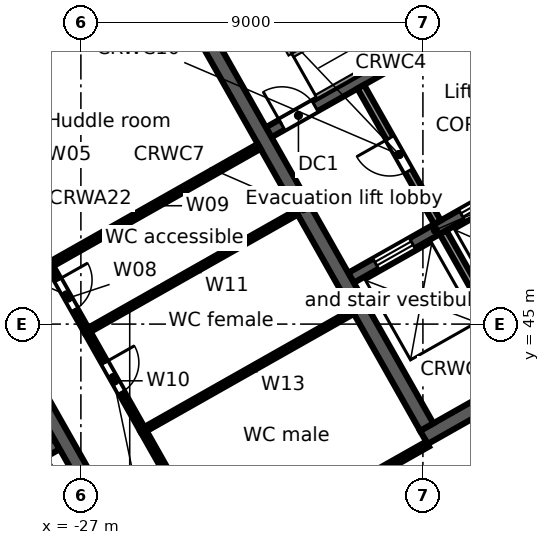
"""IFC4 building model, lengths in metres.
Left out: names, types, materials, properties, quantities, classifications, styles, units other than length and angle.
Written with IfcOpenShell. Run it as: python <this file> out.ifc"""

import sys

from ifc_helpers import new_model, si_unit, direction, frame, frame_2d, origin, place, context, subcontext, project, spatial, rectangle, extrude, element, fill, save


model = new_model("IFC4")
c1 = context("Model", 3, precision=1e-05, world=origin(), true_north=direction((0.0, 1.0)))
c2 = subcontext(c1, "Body", "Model", "MODEL_VIEW")
j1 = project(units=[si_unit("LENGTHUNIT", "METRE"), si_unit("PLANEANGLEUNIT", "RADIAN")], contexts=[c1])
p1 = place(None, origin())
s1 = spatial("IfcSite", under=j1, at=p1, CompositionType="ELEMENT")
p2 = place(p1, origin())
s2 = spatial("IfcBuilding", under=s1, at=p2, CompositionType="ELEMENT")
p3 = place(p2, frame((0.0, 0.0, 277.9)))
s3 = spatial("IfcBuildingStorey", under=s2, at=p3, CompositionType="ELEMENT", Elevation=277.9)
p4 = place(p3, frame((-58.732, 38.771, 0.0), z_axis=(0.0, 0.0, 1.0), x_axis=(0.870355615581, 0.492423702137, 0.0)))
e1 = element("IfcWall", 1, at=p4, inside=s3, PredefinedType="STANDARD", context=c2, shape_type="SweptSolid", body=[
    extrude(rectangle(XDim=64.052, YDim=0.25, at=frame_2d((32.026, 0.0))), origin(), (0.0, 0.0, 1.0), 3.52),
])
p5 = place(p4, frame((61.259, 0.0, 0.8)))
e2 = element("IfcOpeningElement", 2, at=p5, cuts=e1, PredefinedType="OPENING", context=c2, shape_type="SweptSolid", body=[
    extrude(rectangle(XDim=2.4, YDim=2.2, at=frame_2d((1.2, 1.1))), frame((0.0, 0.135, 0.0), z_axis=(0.0, -1.0, 0.0), x_axis=(1.0, 0.0, 0.0)), (0.0, 0.0, 1.0), 0.27),
])
p6 = place(p4, frame((58.216, 0.0, 0.8)))
e3 = element("IfcOpeningElement", 3, at=p6, cuts=e1, PredefinedType="OPENING", context=c2, shape_type="SweptSolid", body=[
    extrude(rectangle(XDim=2.4, YDim=2.2, at=frame_2d((1.2, 1.1))), frame((0.0, 0.135, 0.0), z_axis=(0.0, -1.0, 0.0), x_axis=(1.0, 0.0, 0.0)), (0.0, 0.0, 1.0), 0.27),
])
p7 = place(p4, frame((55.173, 0.0, 0.8)))
e4 = element("IfcOpeningElement", 4, at=p7, cuts=e1, PredefinedType="OPENING", context=c2, shape_type="SweptSolid", body=[
    extrude(rectangle(XDim=2.4, YDim=2.2, at=frame_2d((1.2, 1.1))), frame((0.0, 0.135, 0.0), z_axis=(0.0, -1.0, 0.0), x_axis=(1.0, 0.0, 0.0)), (0.0, 0.0, 1.0), 0.27),
])
p8 = place(p4, frame((52.129, 0.0, 0.8)))
e5 = element("IfcOpeningElement", 5, at=p8, cuts=e1, PredefinedType="OPENING", context=c2, shape_type="SweptSolid", body=[
    extrude(rectangle(XDim=2.4, YDim=2.2, at=frame_2d((1.2, 1.1))), frame((0.0, 0.135, 0.0), z_axis=(0.0, -1.0, 0.0), x_axis=(1.0, 0.0, 0.0)), (0.0, 0.0, 1.0), 0.27),
])
p9 = place(p4, frame((49.086, 0.0, 0.8)))
e6 = element("IfcOpeningElement", 6, at=p9, cuts=e1, PredefinedType="OPENING", context=c2, shape_type="SweptSolid", body=[
    extrude(rectangle(XDim=2.4, YDim=2.2, at=frame_2d((1.2, 1.1))), frame((0.0, 0.135, 0.0), z_axis=(0.0, -1.0, 0.0), x_axis=(1.0, 0.0, 0.0)), (0.0, 0.0, 1.0), 0.27),
])
p10 = place(p4, frame((46.043, 0.0, 0.8)))
e7 = element("IfcOpeningElement", 7, at=p10, cuts=e1, PredefinedType="OPENING", context=c2, shape_type="SweptSolid", body=[
    extrude(rectangle(XDim=2.4, YDim=2.2, at=frame_2d((1.2, 1.1))), frame((0.0, 0.135, 0.0), z_axis=(0.0, -1.0, 0.0), x_axis=(1.0, 0.0, 0.0)), (0.0, 0.0, 1.0), 0.27),
])
p11 = place(p4, frame((43.0, 0.0, 0.8)))
e8 = element("IfcOpeningElement", 8, at=p11, cuts=e1, PredefinedType="OPENING", context=c2, shape_type="SweptSolid", body=[
    extrude(rectangle(XDim=2.4, YDim=2.2, at=frame_2d((1.2, 1.1))), frame((0.0, 0.135, 0.0), z_axis=(0.0, -1.0, 0.0), x_axis=(1.0, 0.0, 0.0)), (0.0, 0.0, 1.0), 0.27),
])
p12 = place(p4, frame((39.956, 0.0, 0.8)))
e9 = element("IfcOpeningElement", 9, at=p12, cuts=e1, PredefinedType="OPENING", context=c2, shape_type="SweptSolid", body=[
    extrude(rectangle(XDim=2.4, YDim=2.2, at=frame_2d((1.2, 1.1))), frame((0.0, 0.135, 0.0), z_axis=(0.0, -1.0, 0.0), x_axis=(1.0, 0.0, 0.0)), (0.0, 0.0, 1.0), 0.27),
])
p13 = place(p4, frame((36.913, 0.0, 0.8)))
e10 = element("IfcOpeningElement", 10, at=p13, cuts=e1, PredefinedType="OPENING", context=c2, shape_type="SweptSolid", body=[
    extrude(rectangle(XDim=2.4, YDim=2.2, at=frame_2d((1.2, 1.1))), frame((0.0, 0.135, 0.0), z_axis=(0.0, -1.0, 0.0), x_axis=(1.0, 0.0, 0.0)), (0.0, 0.0, 1.0), 0.27),
])
p14 = place(p4, frame((33.87, 0.0, 0.8)))
e11 = element("IfcOpeningElement", 11, at=p14, cuts=e1, PredefinedType="OPENING", context=c2, shape_type="SweptSolid", body=[
    extrude(rectangle(XDim=2.4, YDim=2.2, at=frame_2d((1.2, 1.1))), frame((0.0, 0.135, 0.0), z_axis=(0.0, -1.0, 0.0), x_axis=(1.0, 0.0, 0.0)), (0.0, 0.0, 1.0), 0.27),
])
p15 = place(p4, frame((30.826, 0.0, 0.8)))
e12 = element("IfcOpeningElement", 12, at=p15, cuts=e1, PredefinedType="OPENING", context=c2, shape_type="SweptSolid", body=[
    extrude(rectangle(XDim=2.4, YDim=2.2, at=frame_2d((1.2, 1.1))), frame((0.0, 0.135, 0.0), z_axis=(0.0, -1.0, 0.0), x_axis=(1.0, 0.0, 0.0)), (0.0, 0.0, 1.0), 0.27),
])
p16 = place(p4, frame((27.783, 0.0, 0.8)))
e13 = element("IfcOpeningElement", 13, at=p16, cuts=e1, PredefinedType="OPENING", context=c2, shape_type="SweptSolid", body=[
    extrude(rectangle(XDim=2.4, YDim=2.2, at=frame_2d((1.2, 1.1))), frame((0.0, 0.135, 0.0), z_axis=(0.0, -1.0, 0.0), x_axis=(1.0, 0.0, 0.0)), (0.0, 0.0, 1.0), 0.27),
])
p17 = place(p4, frame((24.74, 0.0, 0.8)))
e14 = element("IfcOpeningElement", 14, at=p17, cuts=e1, PredefinedType="OPENING", context=c2, shape_type="SweptSolid", body=[
    extrude(rectangle(XDim=2.4, YDim=2.2, at=frame_2d((1.2, 1.1))), frame((0.0, 0.135, 0.0), z_axis=(0.0, -1.0, 0.0), x_axis=(1.0, 0.0, 0.0)), (0.0, 0.0, 1.0), 0.27),
])
p18 = place(p4, frame((21.696, 0.0, 0.8)))
e15 = element("IfcOpeningElement", 15, at=p18, cuts=e1, PredefinedType="OPENING", context=c2, shape_type="SweptSolid", body=[
    extrude(rectangle(XDim=2.4, YDim=2.2, at=frame_2d((1.2, 1.1))), frame((0.0, 0.135, 0.0), z_axis=(0.0, -1.0, 0.0), x_axis=(1.0, 0.0, 0.0)), (0.0, 0.0, 1.0), 0.27),
])
p19 = place(p4, frame((18.653, 0.0, 0.8)))
e16 = element("IfcOpeningElement", 16, at=p19, cuts=e1, PredefinedType="OPENING", context=c2, shape_type="SweptSolid", body=[
    extrude(rectangle(XDim=2.4, YDim=2.2, at=frame_2d((1.2, 1.1))), frame((0.0, 0.135, 0.0), z_axis=(0.0, -1.0, 0.0), x_axis=(1.0, 0.0, 0.0)), (0.0, 0.0, 1.0), 0.27),
])
p20 = place(p4, frame((15.61, 0.0, 0.8)))
e17 = element("IfcOpeningElement", 17, at=p20, cuts=e1, PredefinedType="OPENING", context=c2, shape_type="SweptSolid", body=[
    extrude(rectangle(XDim=2.4, YDim=2.2, at=frame_2d((1.2, 1.1))), frame((0.0, 0.135, 0.0), z_axis=(0.0, -1.0, 0.0), x_axis=(1.0, 0.0, 0.0)), (0.0, 0.0, 1.0), 0.27),
])
p21 = place(p4, frame((12.567, 0.0, 0.8)))
e18 = element("IfcOpeningElement", 18, at=p21, cuts=e1, PredefinedType="OPENING", context=c2, shape_type="SweptSolid", body=[
    extrude(rectangle(XDim=2.4, YDim=2.2, at=frame_2d((1.2, 1.1))), frame((0.0, 0.135, 0.0), z_axis=(0.0, -1.0, 0.0), x_axis=(1.0, 0.0, 0.0)), (0.0, 0.0, 1.0), 0.27),
])
p22 = place(p4, frame((9.523, 0.0, 0.8)))
e19 = element("IfcOpeningElement", 19, at=p22, cuts=e1, PredefinedType="OPENING", context=c2, shape_type="SweptSolid", body=[
    extrude(rectangle(XDim=2.4, YDim=2.2, at=frame_2d((1.2, 1.1))), frame((0.0, 0.135, 0.0), z_axis=(0.0, -1.0, 0.0), x_axis=(1.0, 0.0, 0.0)), (0.0, 0.0, 1.0), 0.27),
])
p23 = place(p4, frame((6.48, 0.0, 0.8)))
e20 = element("IfcOpeningElement", 20, at=p23, cuts=e1, PredefinedType="OPENING", context=c2, shape_type="SweptSolid", body=[
    extrude(rectangle(XDim=2.4, YDim=2.2, at=frame_2d((1.2, 1.1))), frame((0.0, 0.135, 0.0), z_axis=(0.0, -1.0, 0.0), x_axis=(1.0, 0.0, 0.0)), (0.0, 0.0, 1.0), 0.27),
])
p24 = place(p4, frame((3.437, 0.0, 0.8)))
e21 = element("IfcOpeningElement", 21, at=p24, cuts=e1, PredefinedType="OPENING", context=c2, shape_type="SweptSolid", body=[
    extrude(rectangle(XDim=2.4, YDim=2.2, at=frame_2d((1.2, 1.1))), frame((0.0, 0.135, 0.0), z_axis=(0.0, -1.0, 0.0), x_axis=(1.0, 0.0, 0.0)), (0.0, 0.0, 1.0), 0.27),
])
p25 = place(p4, frame((0.393, 0.0, 0.8)))
e22 = element("IfcOpeningElement", 22, at=p25, cuts=e1, PredefinedType="OPENING", context=c2, shape_type="SweptSolid", body=[
    extrude(rectangle(XDim=2.4, YDim=2.2, at=frame_2d((1.2, 1.1))), frame((0.0, 0.135, 0.0), z_axis=(0.0, -1.0, 0.0), x_axis=(1.0, 0.0, 0.0)), (0.0, 0.0, 1.0), 0.27),
])
p26 = place(p3, frame((-3.017, 46.293, 0.0), z_axis=(0.0, 0.0, 1.0), x_axis=(-0.870355474887, -0.492423950812, 0.0)))
e23 = element("IfcWall", 23, at=p26, inside=s3, PredefinedType="STANDARD", context=c2, shape_type="SweptSolid", body=[
    extrude(rectangle(XDim=40.34, YDim=0.25, at=frame_2d((20.17, 0.0))), origin(), (0.0, 0.0, 1.0), 3.52),
])
p27 = place(p26, frame((37.428, 0.0, 0.8)))
e24 = element("IfcOpeningElement", 24, at=p27, cuts=e23, PredefinedType="OPENING", context=c2, shape_type="SweptSolid", body=[
    extrude(rectangle(XDim=2.4, YDim=2.2, at=frame_2d((1.2, 1.1))), frame((0.0, 0.135, 0.0), z_axis=(0.0, -1.0, 0.0), x_axis=(1.0, 0.0, 0.0)), (0.0, 0.0, 1.0), 0.27),
])
p28 = place(p26, frame((34.372, 0.0, 0.0)))
e25 = element("IfcOpeningElement", 25, at=p28, cuts=e23, PredefinedType="OPENING", context=c2, shape_type="SweptSolid", body=[
    extrude(rectangle(XDim=1.8, YDim=2.4, at=frame_2d((0.9, 1.2))), frame((0.0, 0.135, 0.0), z_axis=(0.0, -1.0, 0.0), x_axis=(1.0, 0.0, 0.0)), (0.0, 0.0, 1.0), 0.27),
])
p29 = place(p26, frame((30.716, 0.0, 0.8)))
e26 = element("IfcOpeningElement", 26, at=p29, cuts=e23, PredefinedType="OPENING", context=c2, shape_type="SweptSolid", body=[
    extrude(rectangle(XDim=2.4, YDim=2.2, at=frame_2d((1.2, 1.1))), frame((0.0, 0.135, 0.0), z_axis=(0.0, -1.0, 0.0), x_axis=(1.0, 0.0, 0.0)), (0.0, 0.0, 1.0), 0.27),
])
p30 = place(p26, frame((27.36, 0.0, 0.8)))
e27 = element("IfcOpeningElement", 27, at=p30, cuts=e23, PredefinedType="OPENING", context=c2, shape_type="SweptSolid", body=[
    extrude(rectangle(XDim=2.4, YDim=2.2, at=frame_2d((1.2, 1.1))), frame((0.0, 0.135, 0.0), z_axis=(0.0, -1.0, 0.0), x_axis=(1.0, 0.0, 0.0)), (0.0, 0.0, 1.0), 0.27),
])
p31 = place(p26, frame((24.304, 0.0, 0.0)))
e28 = element("IfcOpeningElement", 28, at=p31, cuts=e23, PredefinedType="OPENING", context=c2, shape_type="SweptSolid", body=[
    extrude(rectangle(XDim=1.8, YDim=2.4, at=frame_2d((0.9, 1.2))), frame((0.0, 0.135, 0.0), z_axis=(0.0, -1.0, 0.0), x_axis=(1.0, 0.0, 0.0)), (0.0, 0.0, 1.0), 0.27),
])
p32 = place(p26, frame((20.648, 0.0, 0.8)))
e29 = element("IfcOpeningElement", 29, at=p32, cuts=e23, PredefinedType="OPENING", context=c2, shape_type="SweptSolid", body=[
    extrude(rectangle(XDim=2.4, YDim=2.2, at=frame_2d((1.2, 1.1))), frame((0.0, 0.135, 0.0), z_axis=(0.0, -1.0, 0.0), x_axis=(1.0, 0.0, 0.0)), (0.0, 0.0, 1.0), 0.27),
])
p33 = place(p26, frame((17.292, 0.0, 0.8)))
e30 = element("IfcOpeningElement", 30, at=p33, cuts=e23, PredefinedType="OPENING", context=c2, shape_type="SweptSolid", body=[
    extrude(rectangle(XDim=2.4, YDim=2.2, at=frame_2d((1.2, 1.1))), frame((0.0, 0.135, 0.0), z_axis=(0.0, -1.0, 0.0), x_axis=(1.0, 0.0, 0.0)), (0.0, 0.0, 1.0), 0.27),
])
p34 = place(p26, frame((14.236, 0.0, 0.0)))
e31 = element("IfcOpeningElement", 31, at=p34, cuts=e23, PredefinedType="OPENING", context=c2, shape_type="SweptSolid", body=[
    extrude(rectangle(XDim=1.8, YDim=2.4, at=frame_2d((0.9, 1.2))), frame((0.0, 0.135, 0.0), z_axis=(0.0, -1.0, 0.0), x_axis=(1.0, 0.0, 0.0)), (0.0, 0.0, 1.0), 0.27),
])
p35 = place(p26, frame((10.58, 0.0, 0.8)))
e32 = element("IfcOpeningElement", 32, at=p35, cuts=e23, PredefinedType="OPENING", context=c2, shape_type="SweptSolid", body=[
    extrude(rectangle(XDim=2.4, YDim=2.2, at=frame_2d((1.2, 1.1))), frame((0.0, 0.135, 0.0), z_axis=(0.0, -1.0, 0.0), x_axis=(1.0, 0.0, 0.0)), (0.0, 0.0, 1.0), 0.27),
])
p36 = place(p26, frame((7.224, 0.0, 0.8)))
e33 = element("IfcOpeningElement", 33, at=p36, cuts=e23, PredefinedType="OPENING", context=c2, shape_type="SweptSolid", body=[
    extrude(rectangle(XDim=2.4, YDim=2.2, at=frame_2d((1.2, 1.1))), frame((0.0, 0.135, 0.0), z_axis=(0.0, -1.0, 0.0), x_axis=(1.0, 0.0, 0.0)), (0.0, 0.0, 1.0), 0.27),
])
p37 = place(p26, frame((4.168, 0.0, 0.0)))
e34 = element("IfcOpeningElement", 34, at=p37, cuts=e23, PredefinedType="OPENING", context=c2, shape_type="SweptSolid", body=[
    extrude(rectangle(XDim=1.8, YDim=2.4, at=frame_2d((0.9, 1.2))), frame((0.0, 0.135, 0.0), z_axis=(0.0, -1.0, 0.0), x_axis=(1.0, 0.0, 0.0)), (0.0, 0.0, 1.0), 0.27),
])
p38 = place(p26, frame((0.512, 0.0, 0.8)))
e35 = element("IfcOpeningElement", 35, at=p38, cuts=e23, PredefinedType="OPENING", context=c2, shape_type="SweptSolid", body=[
    extrude(rectangle(XDim=2.4, YDim=2.2, at=frame_2d((1.2, 1.1))), frame((0.0, 0.135, 0.0), z_axis=(0.0, -1.0, 0.0), x_axis=(1.0, 0.0, 0.0)), (0.0, 0.0, 1.0), 0.27),
])
p39 = place(p3, frame((-34.245, 38.097, 0.0), z_axis=(0.0, 0.0, 1.0), x_axis=(0.870356351998, 0.492422400523, 0.0)))
e36 = element("IfcWall", 36, at=p39, inside=s3, PredefinedType="SOLIDWALL", context=c2, shape_type="SweptSolid", body=[
    extrude(rectangle(XDim=7.6, YDim=0.3, at=frame_2d((3.8, 0.0))), origin(), (0.0, 0.0, 1.0), 3.52),
])
p40 = place(p39, frame((6.2, 0.0, 0.0)))
e37 = element("IfcOpeningElement", 37, at=p40, cuts=e36, PredefinedType="OPENING", context=c2, shape_type="SweptSolid", body=[
    extrude(rectangle(XDim=1.0, YDim=2.1, at=frame_2d((0.5, 1.05))), frame((0.0, 0.16, 0.0), z_axis=(0.0, -1.0, 0.0), x_axis=(1.0, 0.0, 0.0)), (0.0, 0.0, 1.0), 0.32),
])
p41 = place(p3, frame((-31.79, 49.597, 0.0), z_axis=(0.0, 0.0, 1.0), x_axis=(0.492421663121, -0.870356769198, 0.0)))
e38 = element("IfcWall", 38, at=p41, inside=s3, PredefinedType="SOLIDWALL", context=c2, shape_type="SweptSolid", body=[
    extrude(rectangle(XDim=13.2, YDim=0.4, at=frame_2d((6.6, 0.0))), origin(), (0.0, 0.0, 1.0), 3.52),
])
p42 = place(p3, frame((-17.975, 42.017, 0.0), z_axis=(0.0, 0.0, 1.0), x_axis=(0.87034965173, 0.492434243055, 0.0)))
e39 = element("IfcWall", 39, at=p42, inside=s3, PredefinedType="SOLIDWALL", context=c2, shape_type="SweptSolid", body=[
    extrude(rectangle(XDim=15.0, YDim=0.4, at=frame_2d((7.5, 0.0))), origin(), (0.0, 0.0, 1.0), 3.52),
])
p43 = place(p42, frame((6.1, 0.0, 0.0)))
e40 = element("IfcOpeningElement", 40, at=p43, cuts=e39, PredefinedType="OPENING", context=c2, shape_type="SweptSolid", body=[
    extrude(rectangle(XDim=1.2, YDim=2.1, at=frame_2d((0.6, 1.05))), frame((0.0, 0.21, 0.0), z_axis=(0.0, -1.0, 0.0), x_axis=(1.0, 0.0, 0.0)), (0.0, 0.0, 1.0), 0.42),
])
p44 = place(p3, frame((-19.892, 46.218, 0.0), z_axis=(0.0, 0.0, 1.0), x_axis=(0.870341639186, 0.492448404505, 0.0)))
e41 = element("IfcWall", 41, at=p44, inside=s3, PredefinedType="SOLIDWALL", context=c2, shape_type="SweptSolid", body=[
    extrude(rectangle(XDim=5.1, YDim=0.3, at=frame_2d((2.55, 0.0))), origin(), (0.0, 0.0, 1.0), 3.52),
])
p45 = place(p44, frame((0.75, 0.0, 0.0)))
e42 = element("IfcOpeningElement", 42, at=p45, cuts=e41, PredefinedType="OPENING", context=c2, shape_type="SweptSolid", body=[
    extrude(rectangle(XDim=1.1, YDim=2.1, at=frame_2d((0.55, 1.05))), frame((0.0, 0.16, 0.0), z_axis=(0.0, -1.0, 0.0), x_axis=(1.0, 0.0, 0.0)), (0.0, 0.0, 1.0), 0.32),
])
p46 = place(p44, frame((3.35, 0.0, 0.0)))
e43 = element("IfcOpeningElement", 43, at=p46, cuts=e41, PredefinedType="OPENING", context=c2, shape_type="SweptSolid", body=[
    extrude(rectangle(XDim=1.1, YDim=2.1, at=frame_2d((0.55, 1.05))), frame((0.0, 0.16, 0.0), z_axis=(0.0, -1.0, 0.0), x_axis=(1.0, 0.0, 0.0)), (0.0, 0.0, 1.0), 0.32),
])
p47 = place(p3, frame((-22.059, 50.047, 0.0), z_axis=(0.0, 0.0, 1.0), x_axis=(0.87035077051, 0.49243226567, 0.0)))
e44 = element("IfcWall", 44, at=p47, inside=s3, PredefinedType="SOLIDWALL", context=c2, shape_type="SweptSolid", body=[
    extrude(rectangle(XDim=7.4, YDim=0.3, at=frame_2d((3.7, 0.0))), origin(), (0.0, 0.0, 1.0), 3.52),
])
p48 = place(p47, frame((0.4, 0.0, 0.0)))
e45 = element("IfcOpeningElement", 45, at=p48, cuts=e44, PredefinedType="OPENING", context=c2, shape_type="SweptSolid", body=[
    extrude(rectangle(XDim=1.0, YDim=2.1, at=frame_2d((0.5, 1.05))), frame((0.0, 0.16, 0.0), z_axis=(0.0, -1.0, 0.0), x_axis=(1.0, 0.0, 0.0)), (0.0, 0.0, 1.0), 0.32),
])
p49 = place(p3, frame((-24.4, 53.779, 0.0), z_axis=(0.0, 0.0, 1.0), x_axis=(0.492421663121, -0.870356769198, 0.0)))
e46 = element("IfcWall", 46, at=p49, inside=s3, PredefinedType="SOLIDWALL", context=c2, shape_type="SweptSolid", body=[
    extrude(rectangle(XDim=13.2, YDim=0.4, at=frame_2d((6.6, 0.0))), origin(), (0.0, 0.0, 1.0), 3.52),
])
p50 = place(p3, frame((-17.469, 47.417, 0.0), z_axis=(0.0, 0.0, 1.0), x_axis=(0.492466057713, -0.870331650579, 0.0)))
e47 = element("IfcWall", 47, at=p50, inside=s3, PredefinedType="SOLIDWALL", context=c2, shape_type="SweptSolid", body=[
    extrude(rectangle(XDim=4.25, YDim=0.2, at=frame_2d((2.125, 0.0))), origin(), (0.0, 0.0, 1.0), 3.52),
])
p51 = place(p3, frame((-19.635, 51.246, 0.0), z_axis=(0.0, 0.0, 1.0), x_axis=(0.492408451753, -0.87036424366, 0.0)))
e48 = element("IfcWall", 48, at=p51, inside=s3, PredefinedType="PARTITIONING", context=c2, shape_type="SweptSolid", body=[
    extrude(rectangle(XDim=4.1, YDim=0.2, at=frame_2d((2.05, 0.0))), origin(), (0.0, 0.0, 1.0), 3.52),
])
p52 = place(p51, frame((1.55, 0.0, 0.0)))
e49 = element("IfcOpeningElement", 49, at=p52, cuts=e48, PredefinedType="OPENING", context=c2, shape_type="SweptSolid", body=[
    extrude(rectangle(XDim=1.0, YDim=2.1, at=frame_2d((0.5, 1.05))), frame((0.0, 0.11, 0.0), z_axis=(0.0, -1.0, 0.0), x_axis=(1.0, 0.0, 0.0)), (0.0, 0.0, 1.0), 0.22),
])
p53 = place(p3, frame((-27.827, 46.554, 0.0), z_axis=(0.0, 0.0, 1.0), x_axis=(0.492374954878, -0.870383193662, 0.0)))
e50 = element("IfcWall", 50, at=p53, inside=s3, PredefinedType="PARTITIONING", context=c2, shape_type="SweptSolid", body=[
    extrude(rectangle(XDim=2.0, YDim=0.15, at=frame_2d((1.0, 0.0))), origin(), (0.0, 0.0, 1.0), 2.792),
])
p54 = place(p53, frame((0.45, 0.0, 0.0)))
e51 = element("IfcOpeningElement", 51, at=p54, cuts=e50, PredefinedType="OPENING", context=c2, shape_type="SweptSolid", body=[
    extrude(rectangle(XDim=0.9, YDim=2.1, at=frame_2d((0.45, 1.05))), frame((0.0, 0.085, 0.0), z_axis=(0.0, -1.0, 0.0), x_axis=(1.0, 0.0, 0.0)), (0.0, 0.0, 1.0), 0.17),
])
p55 = place(p3, frame((-27.827, 46.554, 0.0), z_axis=(0.0, 0.0, 1.0), x_axis=(0.870339695563, 0.492451839602, 0.0)))
e52 = element("IfcWall", 52, at=p55, inside=s3, PredefinedType="PARTITIONING", context=c2, shape_type="SweptSolid", body=[
    extrude(rectangle(XDim=6.34, YDim=0.15, at=frame_2d((3.17, 0.0))), origin(), (0.0, 0.0, 1.0), 2.792),
])
p56 = place(p3, frame((-26.842, 44.813, 0.0), z_axis=(0.0, 0.0, 1.0), x_axis=(0.492365617434, -0.870388475779, 0.0)))
e53 = element("IfcWall", 53, at=p56, inside=s3, PredefinedType="PARTITIONING", context=c2, shape_type="SweptSolid", body=[
    extrude(rectangle(XDim=3.0, YDim=0.15, at=frame_2d((1.5, 0.0))), origin(), (0.0, 0.0, 1.0), 2.792),
])
p57 = place(p56, frame((0.95, 0.0, 0.0)))
e54 = element("IfcOpeningElement", 54, at=p57, cuts=e53, PredefinedType="OPENING", context=c2, shape_type="SweptSolid", body=[
    extrude(rectangle(XDim=0.9, YDim=2.1, at=frame_2d((0.45, 1.05))), frame((0.0, 0.085, 0.0), z_axis=(0.0, -1.0, 0.0), x_axis=(1.0, 0.0, 0.0)), (0.0, 0.0, 1.0), 0.17),
])
p58 = place(p3, frame((-26.842, 44.813, 0.0), z_axis=(0.0, 0.0, 1.0), x_axis=(0.870283015025, 0.492552001071, 0.0)))
e55 = element("IfcWall", 55, at=p58, inside=s3, PredefinedType="PARTITIONING", context=c2, shape_type="SweptSolid", body=[
    extrude(rectangle(XDim=6.341, YDim=0.125, at=frame_2d((3.17, 0.0))), origin(), (0.0, 0.0, 1.0), 2.792),
])
p59 = place(p3, frame((-25.365, 42.202, 0.0), z_axis=(0.0, 0.0, 1.0), x_axis=(0.492525823506, -0.870297830159, 0.0)))
e56 = element("IfcWall", 56, at=p59, inside=s3, PredefinedType="PARTITIONING", context=c2, shape_type="SweptSolid", body=[
    extrude(rectangle(XDim=4.0, YDim=0.15, at=frame_2d((2.0, 0.0))), origin(), (0.0, 0.0, 1.0), 3.52),
])
p60 = place(p3, frame((-25.365, 42.202, 0.0), z_axis=(0.0, 0.0, 1.0), x_axis=(0.870320373616, 0.492485986875, 0.0)))
e57 = element("IfcWall", 57, at=p60, inside=s3, PredefinedType="PARTITIONING", context=c2, shape_type="SweptSolid", body=[
    extrude(rectangle(XDim=6.341, YDim=0.125, at=frame_2d((3.171, 0.0))), origin(), (0.0, 0.0, 1.0), 3.52),
])
p61 = place(p3, frame((-23.395, 38.721, 0.0), z_axis=(0.0, 0.0, 1.0), x_axis=(0.870349033841, 0.492435335137, 0.0)))
e58 = element("IfcWall", 58, at=p61, inside=s3, PredefinedType="PARTITIONING", context=c2, shape_type="SweptSolid", body=[
    extrude(rectangle(XDim=6.34, YDim=0.15, at=frame_2d((3.17, 0.0))), origin(), (0.0, 0.0, 1.0), 3.52),
])
p62 = place(p61, frame((2.7, 0.0, 0.0)))
e59 = element("IfcOpeningElement", 59, at=p62, cuts=e58, PredefinedType="OPENING", context=c2, shape_type="SweptSolid", body=[
    extrude(rectangle(XDim=0.9, YDim=2.1, at=frame_2d((0.45, 1.05))), frame((0.0, 0.085, 0.0), z_axis=(0.0, -1.0, 0.0), x_axis=(1.0, 0.0, 0.0)), (0.0, 0.0, 1.0), 0.17),
])
p63 = place(p45, origin())
e60 = element("IfcDoor", 60, at=p63, inside=s3, OperationType="DOUBLE_DOOR_SLIDING", PredefinedType="DOOR", context=c2, shape_type="SweptSolid", body=[
    extrude(rectangle(XDim=1.1, YDim=2.1, at=frame_2d((0.55, 1.05))), frame((0.0, 0.025, 0.0), z_axis=(0.0, -1.0, 0.0), x_axis=(1.0, 0.0, 0.0)), (0.0, 0.0, 1.0), 0.05),
])
fill(e42, e60)
p64 = place(p46, origin())
e61 = element("IfcDoor", 61, at=p64, inside=s3, OperationType="DOUBLE_DOOR_SLIDING", PredefinedType="DOOR", context=c2, shape_type="SweptSolid", body=[
    extrude(rectangle(XDim=1.1, YDim=2.1, at=frame_2d((0.55, 1.05))), frame((0.0, 0.025, 0.0), z_axis=(0.0, -1.0, 0.0), x_axis=(1.0, 0.0, 0.0)), (0.0, 0.0, 1.0), 0.05),
])
fill(e43, e61)
p65 = place(p48, origin())
e62 = element("IfcDoor", 62, at=p65, inside=s3, OperationType="SINGLE_SWING_LEFT", PredefinedType="DOOR", context=c2, shape_type="SweptSolid", body=[
    extrude(rectangle(XDim=1.0, YDim=2.1, at=frame_2d((0.5, 1.05))), frame((0.0, 0.025, 0.0), z_axis=(0.0, -1.0, 0.0), x_axis=(1.0, 0.0, 0.0)), (0.0, 0.0, 1.0), 0.05),
])
fill(e45, e62)
p66 = place(p52, frame((1.0, 0.0, 0.0), z_axis=(0.0, 0.0, 1.0), x_axis=(-1.0, 0.0, 0.0)))
e63 = element("IfcDoor", 63, at=p66, inside=s3, OperationType="SINGLE_SWING_RIGHT", PredefinedType="DOOR", context=c2, shape_type="SweptSolid", body=[
    extrude(rectangle(XDim=1.0, YDim=2.1, at=frame_2d((0.5, 1.05))), frame((0.0, 0.025, 0.0), z_axis=(0.0, -1.0, 0.0), x_axis=(1.0, 0.0, 0.0)), (0.0, 0.0, 1.0), 0.05),
])
fill(e49, e63)
p67 = place(p57, origin())
e64 = element("IfcDoor", 64, at=p67, inside=s3, OperationType="SINGLE_SWING_LEFT", PredefinedType="DOOR", context=c2, shape_type="SweptSolid", body=[
    extrude(rectangle(XDim=0.9, YDim=2.1, at=frame_2d((0.45, 1.05))), frame((0.0, 0.025, 0.0), z_axis=(0.0, -1.0, 0.0), x_axis=(1.0, 0.0, 0.0)), (0.0, 0.0, 1.0), 0.05),
])
fill(e54, e64)
p68 = place(p54, origin())
e65 = element("IfcDoor", 65, at=p68, inside=s3, OperationType="SINGLE_SWING_LEFT", PredefinedType="DOOR", context=c2, shape_type="SweptSolid", body=[
    extrude(rectangle(XDim=0.9, YDim=2.1, at=frame_2d((0.45, 1.05))), frame((0.0, 0.025, 0.0), z_axis=(0.0, -1.0, 0.0), x_axis=(1.0, 0.0, 0.0)), (0.0, 0.0, 1.0), 0.05),
])
fill(e51, e65)
save(model, sys.argv[1])
